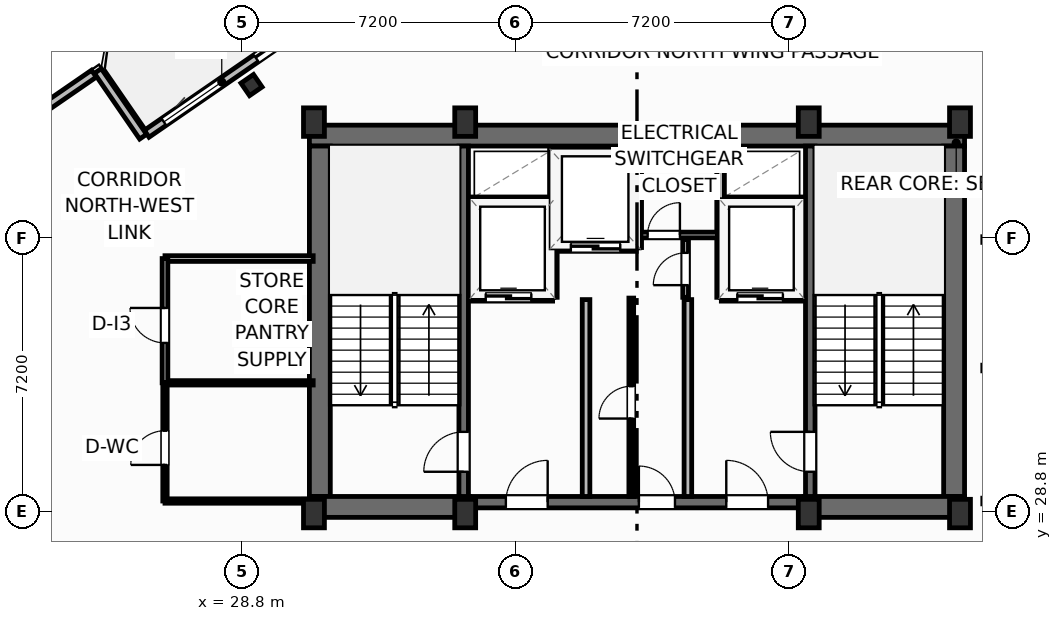
"""IFC4 building model, lengths in metres.
Left out: names, types, materials, properties, quantities, classifications, styles, units other than length and angle.
Written with IfcOpenShell. Run it as: python <this file> out.ifc"""

import sys

from ifc_helpers import new_model, si_unit, direction, frame, frame_2d, origin, origin_2d, place, context, subcontext, project, spatial, rectangle, i_section, extrude, element, fill, save


model = new_model("IFC4")
c1 = context("Model", 3, precision=1e-05, world=origin(), true_north=direction((0.0, 1.0)))
c2 = subcontext(c1, "Body", "Model", "MODEL_VIEW")
j1 = project(units=[si_unit("LENGTHUNIT", "METRE"), si_unit("PLANEANGLEUNIT", "RADIAN")], contexts=[c1])
p1 = place(None, origin())
s1 = spatial("IfcSite", under=j1, at=p1, CompositionType="ELEMENT")
p2 = place(p1, origin())
s2 = spatial("IfcBuilding", under=s1, at=p2, CompositionType="ELEMENT")
p3 = place(p2, frame((0.0, 0.0, 269.3)))
s3 = spatial("IfcBuildingStorey", under=s2, at=p3, CompositionType="ELEMENT", Elevation=269.3)
for number, where, z_axis, x_axis in (
    (1, (30.7, 28.75, 0.0), (0.0, 0.0, 1.0), (1.0, 0.0, 0.0)),
    (2, (34.68, 28.75, 0.0), (0.0, 0.0, 1.0), (1.0, 0.0, 0.0)),
    (3, (43.72, 28.75, 0.0), (0.0, 0.0, 1.0), (1.0, 0.0, 0.0)),
    (4, (47.7, 28.75, 0.0), (0.0, 0.0, 1.0), (1.0, 0.0, 0.0)),
    (5, (30.7, 39.05, 0.0), (0.0, 0.0, 1.0), (1.0, 0.0, 0.0)),
    (6, (34.68, 39.05, 0.0), (0.0, 0.0, 1.0), (1.0, 0.0, 0.0)),
    (7, (43.72, 39.05, 0.0), (0.0, 0.0, 1.0), (1.0, 0.0, 0.0)),
    (8, (47.7, 39.05, 0.0), (0.0, 0.0, 1.0), (1.0, 0.0, 0.0)),
):
    element("IfcColumn", number, at=place(p3, frame(where, z_axis=z_axis, x_axis=x_axis)), inside=s3, PredefinedType="COLUMN", context=c2, shape_type="SweptSolid", body=[
        extrude(rectangle(XDim=0.55, YDim=0.75, at=origin_2d()), origin(), (0.0, 0.0, 1.0), 3.7),
    ])
p4 = place(p3, frame((30.58, 38.695, 0.0), z_axis=(0.0, 0.0, 1.0), x_axis=(1.0, 0.0, 0.0)))
e9 = element("IfcWall", 9, at=p4, inside=s3, PredefinedType="SHEAR", context=c2, shape_type="SweptSolid", body=[
    extrude(rectangle(XDim=17.24, YDim=0.55, at=frame_2d((8.62, 0.0))), origin(), (0.0, 0.0, 1.0), 3.45),
])
for number, where, z_axis, x_axis in (
    (10, (30.855, 29.2, 0.0), (0.0, 0.0, 1.0), (0.0, 1.0, 0.0)),
    (11, (47.545, 29.2, 0.0), (0.0, 0.0, 1.0), (0.0, 1.0, 0.0)),
):
    element("IfcWall", number, at=place(p3, frame(where, z_axis=z_axis, x_axis=x_axis)), inside=s3, PredefinedType="SHEAR", context=c2, shape_type="SweptSolid", body=[
        extrude(rectangle(XDim=9.22, YDim=0.55, at=frame_2d((4.61, 0.0))), origin(), (0.0, 0.0, 1.0), 3.45),
    ])
for number, where, z_axis, x_axis in (
    (12, (30.58, 28.925, 0.0), (0.0, 0.0, 1.0), (1.0, 0.0, 0.0)),
    (13, (43.6, 28.925, 0.0), (0.0, 0.0, 1.0), (1.0, 0.0, 0.0)),
):
    element("IfcWall", number, at=place(p3, frame(where, z_axis=z_axis, x_axis=x_axis)), inside=s3, PredefinedType="SHEAR", context=c2, shape_type="SweptSolid", body=[
        extrude(rectangle(XDim=4.22, YDim=0.55, at=frame_2d((2.11, 0.0))), origin(), (0.0, 0.0, 1.0), 3.45),
    ])
p5 = place(p3, frame((34.8, 29.05, 0.0), z_axis=(0.0, 0.0, 1.0), x_axis=(1.0, 0.0, 0.0)))
e14 = element("IfcWall", 14, at=p5, inside=s3, PredefinedType="SHEAR", context=c2, shape_type="SweptSolid", body=[
    extrude(rectangle(XDim=8.8, YDim=0.3, at=frame_2d((4.4, 0.0))), origin(), (0.0, 0.0, 1.0), 3.45),
])
p6 = place(p5, frame((0.95, 0.0, 0.0)))
e15 = element("IfcOpeningElement", 15, at=p6, cuts=e14, PredefinedType="OPENING", context=c2, shape_type="SweptSolid", body=[
    extrude(rectangle(XDim=1.1, YDim=2.15, at=frame_2d((0.55, 1.075))), frame((0.0, 0.16, 0.0), z_axis=(0.0, -1.0, 0.0), x_axis=(1.0, 0.0, 0.0)), (0.0, 0.0, 1.0), 0.32),
])
p7 = place(p5, frame((6.75, 0.0, 0.0)))
e16 = element("IfcOpeningElement", 16, at=p7, cuts=e14, PredefinedType="OPENING", context=c2, shape_type="SweptSolid", body=[
    extrude(rectangle(XDim=1.1, YDim=2.15, at=frame_2d((0.55, 1.075))), frame((0.0, 0.16, 0.0), z_axis=(0.0, -1.0, 0.0), x_axis=(1.0, 0.0, 0.0)), (0.0, 0.0, 1.0), 0.32),
])
p8 = place(p5, frame((4.45, 0.0, 0.0)))
e17 = element("IfcOpeningElement", 17, at=p8, cuts=e14, PredefinedType="OPENING", context=c2, shape_type="SweptSolid", body=[
    extrude(rectangle(XDim=0.95, YDim=2.15, at=frame_2d((0.475, 1.075))), frame((0.0, 0.16, 0.0), z_axis=(0.0, -1.0, 0.0), x_axis=(1.0, 0.0, 0.0)), (0.0, 0.0, 1.0), 0.32),
])
p9 = place(p3, frame((34.64, 29.2, 0.0), z_axis=(0.0, 0.0, 1.0), x_axis=(0.0, 1.0, 0.0)))
e18 = element("IfcWall", 18, at=p9, inside=s3, PredefinedType="SHEAR", context=c2, shape_type="SweptSolid", body=[
    extrude(rectangle(XDim=9.22, YDim=0.25, at=frame_2d((4.61, 0.0))), origin(), (0.0, 0.0, 1.0), 3.45),
])
p10 = place(p9, frame((0.65, 0.0, 0.0)))
e19 = element("IfcOpeningElement", 19, at=p10, cuts=e18, PredefinedType="OPENING", context=c2, shape_type="SweptSolid", body=[
    extrude(rectangle(XDim=1.05, YDim=2.15, at=frame_2d((0.525, 1.075))), frame((0.0, 0.135, 0.0), z_axis=(0.0, -1.0, 0.0), x_axis=(1.0, 0.0, 0.0)), (0.0, 0.0, 1.0), 0.27),
])
p11 = place(p3, frame((43.76, 29.2, 0.0), z_axis=(0.0, 0.0, 1.0), x_axis=(0.0, 1.0, 0.0)))
e20 = element("IfcWall", 20, at=p11, inside=s3, PredefinedType="SHEAR", context=c2, shape_type="SweptSolid", body=[
    extrude(rectangle(XDim=9.22, YDim=0.25, at=frame_2d((4.61, 0.0))), origin(), (0.0, 0.0, 1.0), 3.45),
])
p12 = place(p11, frame((0.65, 0.0, 0.0)))
e21 = element("IfcOpeningElement", 21, at=p12, cuts=e20, PredefinedType="OPENING", context=c2, shape_type="SweptSolid", body=[
    extrude(rectangle(XDim=1.05, YDim=2.15, at=frame_2d((0.525, 1.075))), frame((0.0, 0.135, 0.0), z_axis=(0.0, -1.0, 0.0), x_axis=(1.0, 0.0, 0.0)), (0.0, 0.0, 1.0), 0.27),
])
p13 = place(p3, frame((29.057, 40.025, 0.0), z_axis=(0.0, 0.0, 1.0), x_axis=(0.823532597628, 0.567268949127, 0.0)))
e22 = element("IfcColumn", 22, at=p13, inside=s3, PredefinedType="COLUMN", context=c2, shape_type="SweptSolid", body=[
    extrude(i_section(OverallWidth=0.401, OverallDepth=0.399, WebThickness=0.025, FlangeThickness=0.04, FilletRadius=0.022, at=origin_2d()), origin(), (0.0, 0.0, 1.0), 3.7),
])
p14 = place(p3, frame((26.297, 38.743, 0.0), z_axis=(0.0, 0.0, 1.0), x_axis=(0.823534636215, 0.567265989598, 0.0)))
e23 = element("IfcWall", 23, at=p14, inside=s3, PredefinedType="SOLIDWALL", context=c2, shape_type="SweptSolid", body=[
    extrude(rectangle(XDim=6.0, YDim=0.22, at=frame_2d((3.0, 0.0))), origin(), (0.0, 0.0, 1.0), 2.73),
])
p15 = place(p14, frame((3.5, 0.0, 0.0)))
e24 = element("IfcOpeningElement", 24, at=p15, cuts=e23, PredefinedType="OPENING", context=c2, shape_type="SweptSolid", body=[
    extrude(rectangle(XDim=2.1, YDim=2.3, at=frame_2d((1.05, 1.15))), frame((0.0, 0.12, 0.0), z_axis=(0.0, -1.0, 0.0), x_axis=(1.0, 0.0, 0.0)), (0.0, 0.0, 1.0), 0.24),
])
p16 = place(p14, frame((0.55, 0.0, 0.75)))
e25 = element("IfcOpeningElement", 25, at=p16, cuts=e23, PredefinedType="OPENING", context=c2, shape_type="SweptSolid", body=[
    extrude(rectangle(XDim=1.85, YDim=1.75, at=frame_2d((0.925, 0.875))), frame((0.0, 0.12, 0.0), z_axis=(0.0, -1.0, 0.0), x_axis=(1.0, 0.0, 0.0)), (0.0, 0.0, 1.0), 0.24),
])
p17 = place(p3, frame((26.204, 38.667, 0.0), z_axis=(0.0, 0.0, 1.0), x_axis=(-0.567219383419, 0.823566737474, 0.0)))
e26 = element("IfcWall", 26, at=p17, inside=s3, PredefinedType="SOLIDWALL", context=c2, shape_type="SweptSolid", body=[
    extrude(rectangle(XDim=2.1, YDim=0.22, at=frame_2d((1.05, 0.0))), origin(), (0.0, 0.0, 1.0), 2.73),
])
p18 = place(p3, frame((24.91, 40.325, 0.0), z_axis=(0.0, 0.0, 1.0), x_axis=(-0.823521165086, -0.56728554596, 0.0)))
e27 = element("IfcWall", 27, at=p18, inside=s3, PredefinedType="SOLIDWALL", context=c2, shape_type="SweptSolid", body=[
    extrude(rectangle(XDim=8.035, YDim=0.22, at=frame_2d((4.018, 0.0))), origin(), (0.0, 0.0, 1.0), 2.73),
])
p19 = place(p18, frame((2.968, 0.0, 0.8)))
e28 = element("IfcOpeningElement", 28, at=p19, cuts=e27, PredefinedType="OPENING", context=c2, shape_type="SweptSolid", body=[
    extrude(rectangle(XDim=2.1, YDim=1.75, at=frame_2d((1.05, 0.875))), frame((0.0, 0.12, 0.0), z_axis=(0.0, -1.0, 0.0), x_axis=(1.0, 0.0, 0.0)), (0.0, 0.0, 1.0), 0.24),
])
for number, where, z_axis, x_axis in (
    (29, (37.86, 29.2, 0.0), (0.0, 0.0, 1.0), (0.0, 1.0, 0.0)),
    (30, (40.54, 29.2, 0.0), (0.0, 0.0, 1.0), (0.0, 1.0, 0.0)),
):
    element("IfcWall", number, at=place(p3, frame(where, z_axis=z_axis, x_axis=x_axis)), inside=s3, PredefinedType="PARTITIONING", context=c2, shape_type="SweptSolid", body=[
        extrude(rectangle(XDim=5.18, YDim=0.2, at=frame_2d((2.59, 0.0))), origin(), (0.0, 0.0, 1.0), 3.45),
    ])
p20 = place(p3, frame((34.8, 34.44, 0.0), z_axis=(0.0, 0.0, 1.0), x_axis=(1.0, 0.0, 0.0)))
e31 = element("IfcWall", 31, at=p20, inside=s3, PredefinedType="PARTITIONING", context=c2, shape_type="SweptSolid", body=[
    extrude(rectangle(XDim=2.18, YDim=0.2, at=frame_2d((1.09, 0.0))), origin(), (0.0, 0.0, 1.0), 3.45),
])
p21 = place(p20, frame((0.42, 0.0, 0.0)))
e32 = element("IfcOpeningElement", 32, at=p21, cuts=e31, PredefinedType="OPENING", context=c2, shape_type="SweptSolid", body=[
    extrude(rectangle(XDim=1.2, YDim=2.2, at=frame_2d((0.6, 1.1))), frame((0.0, 0.11, 0.0), z_axis=(0.0, -1.0, 0.0), x_axis=(1.0, 0.0, 0.0)), (0.0, 0.0, 1.0), 0.22),
])
p22 = place(p3, frame((34.8, 36.98, 0.0), z_axis=(0.0, 0.0, 1.0), x_axis=(1.0, 0.0, 0.0)))
e33 = element("IfcWall", 33, at=p22, inside=s3, PredefinedType="PARTITIONING", context=c2, shape_type="SweptSolid", body=[
    extrude(rectangle(XDim=2.18, YDim=0.2, at=frame_2d((1.09, 0.0))), origin(), (0.0, 0.0, 1.0), 3.45),
])
p23 = place(p3, frame((37.0, 34.44, 0.0), z_axis=(0.0, 0.0, 1.0), x_axis=(0.0, 1.0, 0.0)))
e34 = element("IfcWall", 34, at=p23, inside=s3, PredefinedType="PARTITIONING", context=c2, shape_type="SweptSolid", body=[
    extrude(rectangle(XDim=3.9, YDim=0.2, at=frame_2d((1.95, 0.0))), origin(), (0.0, 0.0, 1.0), 3.45),
])
p24 = place(p3, frame((41.42, 34.44, 0.0), z_axis=(0.0, 0.0, 1.0), x_axis=(1.0, 0.0, 0.0)))
e35 = element("IfcWall", 35, at=p24, inside=s3, PredefinedType="PARTITIONING", context=c2, shape_type="SweptSolid", body=[
    extrude(rectangle(XDim=2.18, YDim=0.2, at=frame_2d((1.09, 0.0))), origin(), (0.0, 0.0, 1.0), 3.45),
])
p25 = place(p24, frame((0.42, 0.0, 0.0)))
e36 = element("IfcOpeningElement", 36, at=p25, cuts=e35, PredefinedType="OPENING", context=c2, shape_type="SweptSolid", body=[
    extrude(rectangle(XDim=1.2, YDim=2.2, at=frame_2d((0.6, 1.1))), frame((0.0, 0.11, 0.0), z_axis=(0.0, -1.0, 0.0), x_axis=(1.0, 0.0, 0.0)), (0.0, 0.0, 1.0), 0.22),
])
p26 = place(p3, frame((41.42, 36.98, 0.0), z_axis=(0.0, 0.0, 1.0), x_axis=(1.0, 0.0, 0.0)))
e37 = element("IfcWall", 37, at=p26, inside=s3, PredefinedType="PARTITIONING", context=c2, shape_type="SweptSolid", body=[
    extrude(rectangle(XDim=2.18, YDim=0.2, at=frame_2d((1.09, 0.0))), origin(), (0.0, 0.0, 1.0), 3.45),
])
p27 = place(p3, frame((41.4, 34.44, 0.0), z_axis=(0.0, 0.0, 1.0), x_axis=(0.0, 1.0, 0.0)))
e38 = element("IfcWall", 38, at=p27, inside=s3, PredefinedType="PARTITIONING", context=c2, shape_type="SweptSolid", body=[
    extrude(rectangle(XDim=3.9, YDim=0.2, at=frame_2d((1.95, 0.0))), origin(), (0.0, 0.0, 1.0), 3.45),
])
p28 = place(p3, frame((37.06, 35.75, 0.0), z_axis=(0.0, 0.0, 1.0), x_axis=(1.0, 0.0, 0.0)))
e39 = element("IfcWall", 39, at=p28, inside=s3, PredefinedType="PARTITIONING", context=c2, shape_type="SweptSolid", body=[
    extrude(rectangle(XDim=2.12, YDim=0.2, at=frame_2d((1.06, 0.0))), origin(), (0.0, 0.0, 1.0), 3.45),
])
p29 = place(p28, frame((0.4, 0.0, 0.0)))
e40 = element("IfcOpeningElement", 40, at=p29, cuts=e39, PredefinedType="OPENING", context=c2, shape_type="SweptSolid", body=[
    extrude(rectangle(XDim=1.3, YDim=2.2, at=frame_2d((0.65, 1.1))), frame((0.0, 0.11, 0.0), z_axis=(0.0, -1.0, 0.0), x_axis=(1.0, 0.0, 0.0)), (0.0, 0.0, 1.0), 0.22),
])
p30 = place(p3, frame((39.22, 35.75, 0.0), z_axis=(0.0, 0.0, 1.0), x_axis=(0.0, 1.0, 0.0)))
e41 = element("IfcWall", 41, at=p30, inside=s3, PredefinedType="PARTITIONING", context=c2, shape_type="SweptSolid", body=[
    extrude(rectangle(XDim=2.59, YDim=0.2, at=frame_2d((1.295, 0.0))), origin(), (0.0, 0.0, 1.0), 3.45),
])
p31 = place(p3, frame((39.3, 36.08, 0.0), z_axis=(0.0, 0.0, 1.0), x_axis=(1.0, 0.0, 0.0)))
e42 = element("IfcWall", 42, at=p31, inside=s3, PredefinedType="PARTITIONING", context=c2, shape_type="SweptSolid", body=[
    extrude(rectangle(XDim=2.02, YDim=0.15, at=frame_2d((1.01, 0.0))), origin(), (0.0, 0.0, 1.0), 3.45),
])
p32 = place(p31, frame((0.18, 0.0, 0.0)))
e43 = element("IfcOpeningElement", 43, at=p32, cuts=e42, PredefinedType="OPENING", context=c2, shape_type="SweptSolid", body=[
    extrude(rectangle(XDim=0.85, YDim=2.05, at=frame_2d((0.425, 1.025))), frame((0.0, 0.085, 0.0), z_axis=(0.0, -1.0, 0.0), x_axis=(1.0, 0.0, 0.0)), (0.0, 0.0, 1.0), 0.17),
])
p33 = place(p3, frame((40.48, 34.44, 0.0), z_axis=(0.0, 0.0, 1.0), x_axis=(0.0, 1.0, 0.0)))
e44 = element("IfcWall", 44, at=p33, inside=s3, PredefinedType="PARTITIONING", context=c2, shape_type="SweptSolid", body=[
    extrude(rectangle(XDim=1.52, YDim=0.15, at=frame_2d((0.76, 0.0))), origin(), (0.0, 0.0, 1.0), 3.45),
])
p34 = place(p33, frame((0.32, 0.0, 0.0)))
e45 = element("IfcOpeningElement", 45, at=p34, cuts=e44, PredefinedType="OPENING", context=c2, shape_type="SweptSolid", body=[
    extrude(rectangle(XDim=0.85, YDim=2.05, at=frame_2d((0.425, 1.025))), frame((0.0, 0.085, 0.0), z_axis=(0.0, -1.0, 0.0), x_axis=(1.0, 0.0, 0.0)), (0.0, 0.0, 1.0), 0.17),
])
p35 = place(p3, frame((39.05, 29.2, 0.0), z_axis=(0.0, 0.0, 1.0), x_axis=(0.0, 1.0, 0.0)))
e46 = element("IfcWall", 46, at=p35, inside=s3, PredefinedType="PARTITIONING", context=c2, shape_type="SweptSolid", body=[
    extrude(rectangle(XDim=5.22, YDim=0.125, at=frame_2d((2.61, 0.0))), origin(), (0.0, 0.0, 1.0), 3.45),
])
p36 = place(p35, frame((2.05, 0.0, 0.0)))
e47 = element("IfcOpeningElement", 47, at=p36, cuts=e46, PredefinedType="OPENING", context=c2, shape_type="SweptSolid", body=[
    extrude(rectangle(XDim=0.85, YDim=2.05, at=frame_2d((0.425, 1.025))), frame((0.0, 0.073, 0.0), z_axis=(0.0, -1.0, 0.0), x_axis=(1.0, 0.0, 0.0)), (0.0, 0.0, 1.0), 0.145),
])
p37 = place(p3, frame((26.8, 32.19, 0.0), z_axis=(0.0, 0.0, 1.0), x_axis=(1.0, 0.0, 0.0)))
e48 = element("IfcWall", 48, at=p37, inside=s3, PredefinedType="PARTITIONING", context=c2, shape_type="SweptSolid", body=[
    extrude(rectangle(XDim=3.88, YDim=0.115, at=frame_2d((1.94, 0.0))), origin(), (0.0, 0.0, 1.0), 3.45),
])
p38 = place(p3, frame((26.78, 29.08, 0.0), z_axis=(0.0, 0.0, 1.0), x_axis=(1.0, 0.0, 0.0)))
e49 = element("IfcWall", 49, at=p38, inside=s3, PredefinedType="PARTITIONING", context=c2, shape_type="SweptSolid", body=[
    extrude(rectangle(XDim=3.8, YDim=0.115, at=frame_2d((1.9, 0.0))), origin(), (0.0, 0.0, 1.0), 3.45),
])
p39 = place(p3, frame((26.78, 35.46, 0.0), z_axis=(0.0, 0.0, 1.0), x_axis=(1.0, 0.0, 0.0)))
e50 = element("IfcWall", 50, at=p39, inside=s3, PredefinedType="PARTITIONING", context=c2, shape_type="SweptSolid", body=[
    extrude(rectangle(XDim=3.9, YDim=0.15, at=frame_2d((1.95, 0.0))), origin(), (0.0, 0.0, 1.0), 3.45),
])
p40 = place(p3, frame((26.78, 29.08, 0.0), z_axis=(0.0, 0.0, 1.0), x_axis=(0.0, 1.0, 0.0)))
e51 = element("IfcWall", 51, at=p40, inside=s3, PredefinedType="PARTITIONING", context=c2, shape_type="SweptSolid", body=[
    extrude(rectangle(XDim=3.11, YDim=0.115, at=frame_2d((1.555, 0.0))), origin(), (0.0, 0.0, 1.0), 3.45),
])
p41 = place(p40, frame((0.95, 0.0, 0.0)))
e52 = element("IfcOpeningElement", 52, at=p41, cuts=e51, PredefinedType="OPENING", context=c2, shape_type="SweptSolid", body=[
    extrude(rectangle(XDim=0.9, YDim=2.05, at=frame_2d((0.45, 1.025))), frame((0.0, 0.067, 0.0), z_axis=(0.0, -1.0, 0.0), x_axis=(1.0, 0.0, 0.0)), (0.0, 0.0, 1.0), 0.135),
])
p42 = place(p3, frame((26.78, 32.19, 0.0), z_axis=(0.0, 0.0, 1.0), x_axis=(0.0, 1.0, 0.0)))
e53 = element("IfcWall", 53, at=p42, inside=s3, PredefinedType="PARTITIONING", context=c2, shape_type="SweptSolid", body=[
    extrude(rectangle(XDim=3.27, YDim=0.15, at=frame_2d((1.635, 0.0))), origin(), (0.0, 0.0, 1.0), 3.45),
])
p43 = place(p42, frame((1.05, 0.0, 0.0)))
e54 = element("IfcOpeningElement", 54, at=p43, cuts=e53, PredefinedType="OPENING", context=c2, shape_type="SweptSolid", body=[
    extrude(rectangle(XDim=0.92, YDim=2.05, at=frame_2d((0.46, 1.025))), frame((0.0, 0.085, 0.0), z_axis=(0.0, -1.0, 0.0), x_axis=(1.0, 0.0, 0.0)), (0.0, 0.0, 1.0), 0.17),
])
p44 = place(p15, origin())
e55 = element("IfcDoor", 55, at=p44, inside=s3, OperationType="SLIDING_TO_LEFT", PredefinedType="DOOR", context=c2, shape_type="SweptSolid", body=[
    extrude(rectangle(XDim=2.1, YDim=2.3, at=frame_2d((1.05, 1.15))), frame((0.0, 0.025, 0.0), z_axis=(0.0, -1.0, 0.0), x_axis=(1.0, 0.0, 0.0)), (0.0, 0.0, 1.0), 0.05),
])
fill(e24, e55)
p45 = place(p16, origin())
e56 = element("IfcWindow", 56, at=p45, inside=s3, PartitioningType="SINGLE_PANEL", PredefinedType="WINDOW", context=c2, shape_type="SweptSolid", body=[
    extrude(rectangle(XDim=1.85, YDim=1.75, at=frame_2d((0.925, 0.875))), frame((0.0, 0.03, 0.0), z_axis=(0.0, -1.0, 0.0), x_axis=(1.0, 0.0, 0.0)), (0.0, 0.0, 1.0), 0.06),
])
fill(e25, e56)
p46 = place(p10, origin())
e57 = element("IfcDoor", 57, at=p46, inside=s3, OperationType="SINGLE_SWING_LEFT", PredefinedType="DOOR", context=c2, shape_type="SweptSolid", body=[
    extrude(rectangle(XDim=1.05, YDim=2.15, at=frame_2d((0.525, 1.075))), frame((0.0, 0.025, 0.0), z_axis=(0.0, -1.0, 0.0), x_axis=(1.0, 0.0, 0.0)), (0.0, 0.0, 1.0), 0.05),
])
fill(e19, e57)
p47 = place(p12, origin())
e58 = element("IfcDoor", 58, at=p47, inside=s3, OperationType="SINGLE_SWING_RIGHT", PredefinedType="DOOR", context=c2, shape_type="SweptSolid", body=[
    extrude(rectangle(XDim=1.05, YDim=2.15, at=frame_2d((0.525, 1.075))), frame((0.0, 0.025, 0.0), z_axis=(0.0, -1.0, 0.0), x_axis=(1.0, 0.0, 0.0)), (0.0, 0.0, 1.0), 0.05),
])
fill(e21, e58)
p48 = place(p6, origin())
e59 = element("IfcDoor", 59, at=p48, inside=s3, OperationType="SINGLE_SWING_RIGHT", PredefinedType="DOOR", context=c2, shape_type="SweptSolid", body=[
    extrude(rectangle(XDim=1.1, YDim=2.15, at=frame_2d((0.55, 1.075))), frame((0.0, 0.025, 0.0), z_axis=(0.0, -1.0, 0.0), x_axis=(1.0, 0.0, 0.0)), (0.0, 0.0, 1.0), 0.05),
])
fill(e15, e59)
p49 = place(p7, origin())
e60 = element("IfcDoor", 60, at=p49, inside=s3, OperationType="SINGLE_SWING_LEFT", PredefinedType="DOOR", context=c2, shape_type="SweptSolid", body=[
    extrude(rectangle(XDim=1.1, YDim=2.15, at=frame_2d((0.55, 1.075))), frame((0.0, 0.025, 0.0), z_axis=(0.0, -1.0, 0.0), x_axis=(1.0, 0.0, 0.0)), (0.0, 0.0, 1.0), 0.05),
])
fill(e16, e60)
p50 = place(p21, origin())
e61 = element("IfcDoor", 61, at=p50, inside=s3, OperationType="SLIDING_TO_LEFT", PredefinedType="DOOR", context=c2, shape_type="SweptSolid", body=[
    extrude(rectangle(XDim=1.2, YDim=2.2, at=frame_2d((0.6, 1.1))), frame((0.0, 0.025, 0.0), z_axis=(0.0, -1.0, 0.0), x_axis=(1.0, 0.0, 0.0)), (0.0, 0.0, 1.0), 0.05),
])
fill(e32, e61)
p51 = place(p25, origin())
e62 = element("IfcDoor", 62, at=p51, inside=s3, OperationType="SLIDING_TO_LEFT", PredefinedType="DOOR", context=c2, shape_type="SweptSolid", body=[
    extrude(rectangle(XDim=1.2, YDim=2.2, at=frame_2d((0.6, 1.1))), frame((0.0, 0.025, 0.0), z_axis=(0.0, -1.0, 0.0), x_axis=(1.0, 0.0, 0.0)), (0.0, 0.0, 1.0), 0.05),
])
fill(e36, e62)
p52 = place(p29, origin())
e63 = element("IfcDoor", 63, at=p52, inside=s3, OperationType="SLIDING_TO_LEFT", PredefinedType="DOOR", context=c2, shape_type="SweptSolid", body=[
    extrude(rectangle(XDim=1.3, YDim=2.2, at=frame_2d((0.65, 1.1))), frame((0.0, 0.025, 0.0), z_axis=(0.0, -1.0, 0.0), x_axis=(1.0, 0.0, 0.0)), (0.0, 0.0, 1.0), 0.05),
])
fill(e40, e63)
p53 = place(p32, origin())
e64 = element("IfcDoor", 64, at=p53, inside=s3, OperationType="SINGLE_SWING_RIGHT", PredefinedType="DOOR", context=c2, shape_type="SweptSolid", body=[
    extrude(rectangle(XDim=0.85, YDim=2.05, at=frame_2d((0.425, 1.025))), frame((0.0, 0.025, 0.0), z_axis=(0.0, -1.0, 0.0), x_axis=(1.0, 0.0, 0.0)), (0.0, 0.0, 1.0), 0.05),
])
fill(e43, e64)
p54 = place(p34, origin())
e65 = element("IfcDoor", 65, at=p54, inside=s3, OperationType="SINGLE_SWING_LEFT", PredefinedType="DOOR", context=c2, shape_type="SweptSolid", body=[
    extrude(rectangle(XDim=0.85, YDim=2.05, at=frame_2d((0.425, 1.025))), frame((0.0, 0.025, 0.0), z_axis=(0.0, -1.0, 0.0), x_axis=(1.0, 0.0, 0.0)), (0.0, 0.0, 1.0), 0.05),
])
fill(e45, e65)
p55 = place(p36, origin())
e66 = element("IfcDoor", 66, at=p55, inside=s3, OperationType="SINGLE_SWING_LEFT", PredefinedType="DOOR", context=c2, shape_type="SweptSolid", body=[
    extrude(rectangle(XDim=0.85, YDim=2.05, at=frame_2d((0.425, 1.025))), frame((0.0, 0.025, 0.0), z_axis=(0.0, -1.0, 0.0), x_axis=(1.0, 0.0, 0.0)), (0.0, 0.0, 1.0), 0.05),
])
fill(e47, e66)
p56 = place(p8, origin())
e67 = element("IfcDoor", 67, at=p56, inside=s3, OperationType="SINGLE_SWING_LEFT", PredefinedType="DOOR", context=c2, shape_type="SweptSolid", body=[
    extrude(rectangle(XDim=0.95, YDim=2.15, at=frame_2d((0.475, 1.075))), frame((0.0, 0.025, 0.0), z_axis=(0.0, -1.0, 0.0), x_axis=(1.0, 0.0, 0.0)), (0.0, 0.0, 1.0), 0.05),
])
fill(e17, e67)
p57 = place(p41, origin())
e68 = element("IfcDoor", 68, at=p57, inside=s3, OperationType="SINGLE_SWING_LEFT", PredefinedType="DOOR", context=c2, shape_type="SweptSolid", body=[
    extrude(rectangle(XDim=0.9, YDim=2.05, at=frame_2d((0.45, 1.025))), frame((0.0, 0.025, 0.0), z_axis=(0.0, -1.0, 0.0), x_axis=(1.0, 0.0, 0.0)), (0.0, 0.0, 1.0), 0.05),
])
fill(e52, e68)
p58 = place(p43, origin())
e69 = element("IfcDoor", 69, at=p58, inside=s3, OperationType="SINGLE_SWING_RIGHT", PredefinedType="DOOR", context=c2, shape_type="SweptSolid", body=[
    extrude(rectangle(XDim=0.92, YDim=2.05, at=frame_2d((0.46, 1.025))), frame((0.0, 0.025, 0.0), z_axis=(0.0, -1.0, 0.0), x_axis=(1.0, 0.0, 0.0)), (0.0, 0.0, 1.0), 0.05),
])
fill(e54, e69)
save(model, sys.argv[1])
